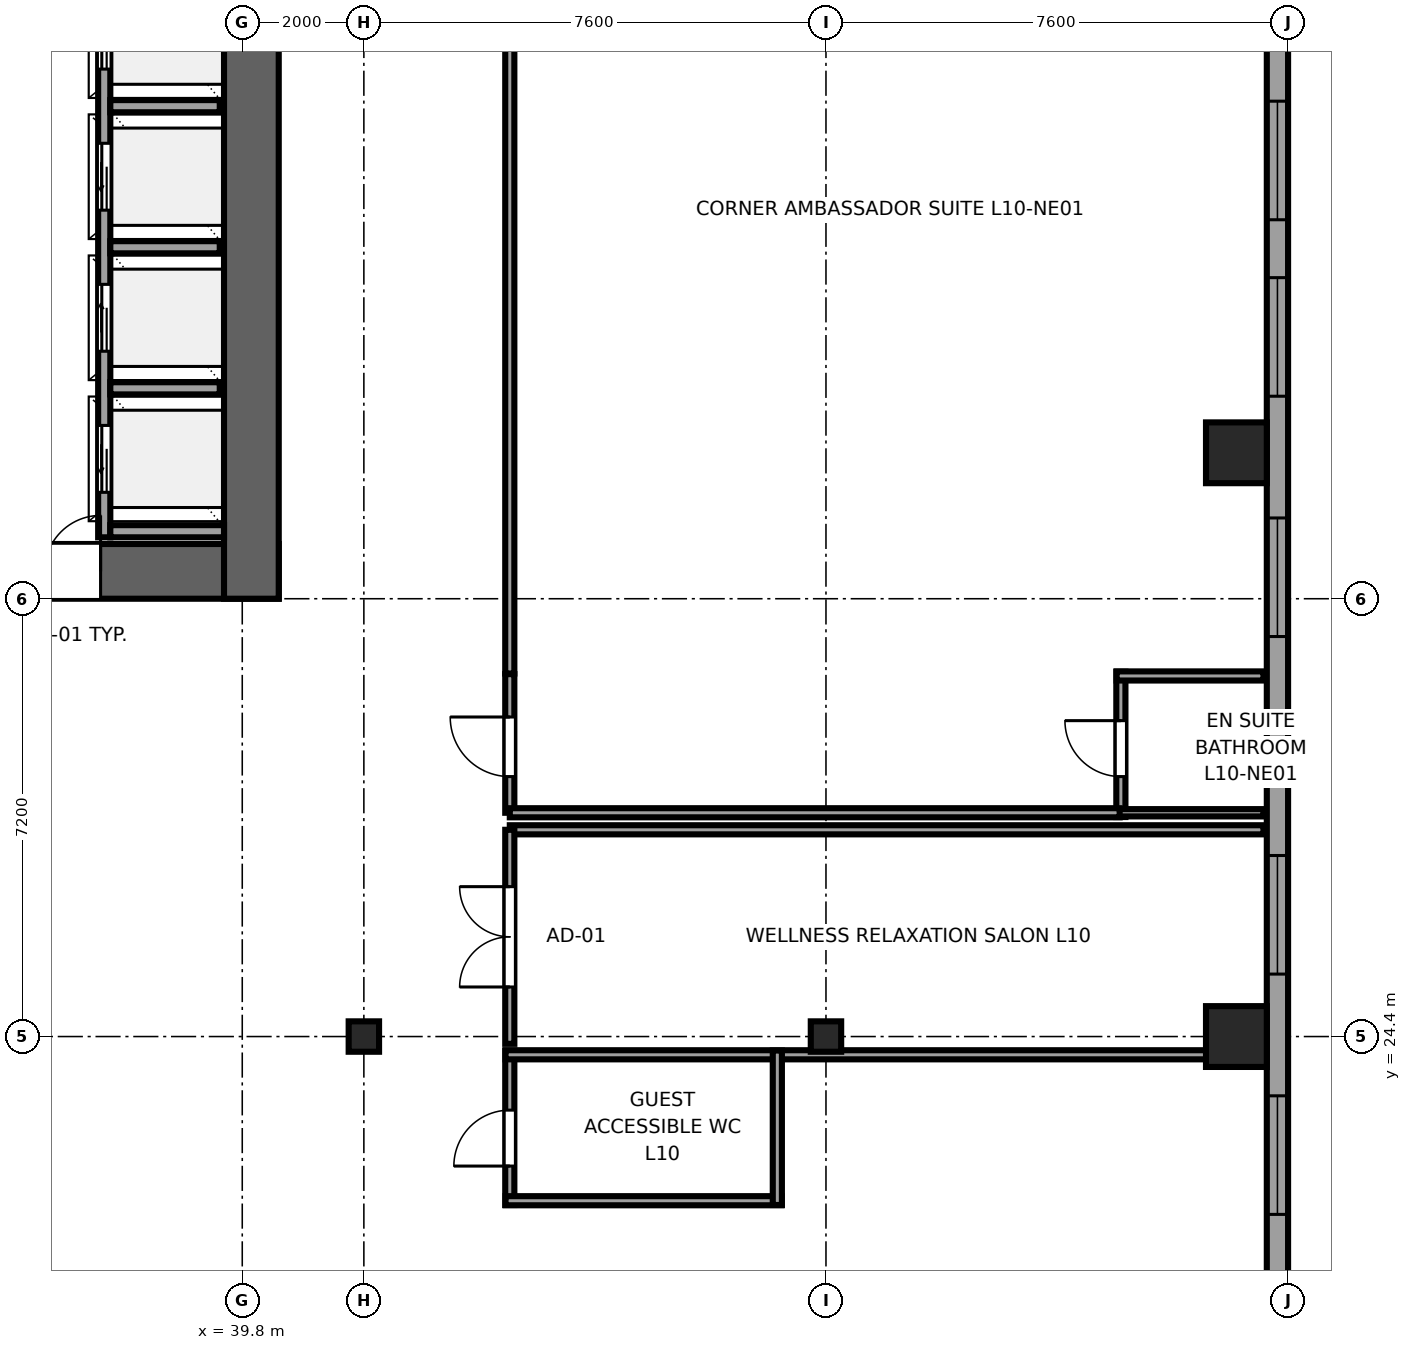
"""IFC4 building model, lengths in metres.
Left out: names, types, materials, properties, quantities, classifications, styles, units other than length and angle.
Written with IfcOpenShell. Run it as: python <this file> out.ifc"""

import sys

from ifc_helpers import new_model, si_unit, direction, frame, frame_2d, origin, origin_2d, place, context, subcontext, project, spatial, rectangle, i_section, extrude, source, transform, mapped, element, fill, save


model = new_model("IFC4")
c1 = context("Model", 3, precision=1e-05, world=origin(), true_north=direction((0.0, 1.0)))
c2 = subcontext(c1, "Body", "Model", "MODEL_VIEW")
j1 = project(units=[si_unit("LENGTHUNIT", "METRE"), si_unit("PLANEANGLEUNIT", "RADIAN")], contexts=[c1])
p1 = place(None, origin())
s1 = spatial("IfcSite", under=j1, at=p1, CompositionType="ELEMENT")
p2 = place(p1, origin())
s2 = spatial("IfcBuilding", under=s1, at=p2, CompositionType="ELEMENT")
p3 = place(p2, frame((0.0, 0.0, 46.2)))
s3 = spatial("IfcBuildingStorey", under=s2, at=p3, CompositionType="ELEMENT", Elevation=46.2)
p4 = place(p3, frame((36.4, 32.05, 0.0), z_axis=(0.0, 0.0, 1.0), x_axis=(1.0, 0.0, 0.0)))
e1 = element("IfcWall", 1, at=p4, inside=s3, PredefinedType="SHEAR", context=c2, shape_type="SweptSolid", body=[
    extrude(rectangle(XDim=4.0, YDim=0.9, at=frame_2d((2.0, 0.0))), origin(), (0.0, 0.0, 1.0), 3.55),
])
p5 = place(p4, frame((1.07, 0.0, 0.0), z_axis=(0.0, 0.0, 1.0), x_axis=(-1.0, 0.0, 0.0)))
e2 = element("IfcOpeningElement", 2, at=p5, cuts=e1, PredefinedType="OPENING", context=c2, shape_type="SweptSolid", body=[
    extrude(rectangle(XDim=0.92, YDim=2.01, at=frame_2d((0.46, 1.005))), frame((0.0, 0.46, 0.0), z_axis=(0.0, -1.0, 0.0), x_axis=(1.0, 0.0, 0.0)), (0.0, 0.0, 1.0), 0.92),
])
p6 = place(p3, frame((39.95, 31.6, 0.0), z_axis=(0.0, 0.0, 1.0), x_axis=(0.0, 1.0, 0.0)))
e3 = element("IfcWall", 3, at=p6, inside=s3, PredefinedType="SHEAR", context=c2, shape_type="SweptSolid", body=[
    extrude(rectangle(XDim=13.6, YDim=0.9, at=frame_2d((6.8, 0.0))), origin(), (0.0, 0.0, 1.0), 3.55),
])
m1 = source(origin(), c2, "Body", "SweptSolid", [
    extrude(i_section(OverallWidth=0.5, OverallDepth=0.5, WebThickness=0.028, FlangeThickness=0.045, at=origin_2d()), origin(), (0.0, 0.0, 1.0), 3.55),
])
for number, where, z_axis, x_axis in (
    (4, (41.8, 24.4, 0.0), (0.0, 0.0, 1.0), (1.0, 0.0, 0.0)),
    (5, (49.4, 24.4, 0.0), (0.0, 0.0, 1.0), (1.0, 0.0, 0.0)),
):
    element("IfcColumn", number, at=place(p3, frame(where, z_axis=z_axis, x_axis=x_axis)), inside=s3, PredefinedType="COLUMN", context=c2, shape_type="MappedRepresentation", body=[
        mapped(m1, transform((0.0, 0.0, 0.0), x_axis=(1.0, 0.0, 0.0), y_axis=(0.0, 1.0, 0.0), z_axis=(0.0, 0.0, 1.0), scale=1.0)),
    ])
m2 = source(origin(), c2, "Body", "SweptSolid", [
    extrude(rectangle(XDim=1.0, YDim=1.0, at=origin_2d()), origin(), (0.0, 0.0, 1.0), 3.55),
])
for number, where, z_axis, x_axis in (
    (6, (56.15, 24.4, 0.0), (0.0, 0.0, 1.0), (1.0, 0.0, 0.0)),
    (7, (56.15, 34.0, 0.0), (0.0, 0.0, 1.0), (1.0, 0.0, 0.0)),
):
    element("IfcColumn", number, at=place(p3, frame(where, z_axis=z_axis, x_axis=x_axis)), inside=s3, PredefinedType="COLUMN", context=c2, shape_type="MappedRepresentation", body=[
        mapped(m2, transform((0.0, 0.0, 0.0), x_axis=(1.0, 0.0, 0.0), y_axis=(0.0, 1.0, 0.0), z_axis=(0.0, 0.0, 1.0), scale=1.0)),
    ])
p7 = place(p3, frame((56.825, 4.617, 0.0), z_axis=(0.0, 0.0, 1.0), x_axis=(0.0, 1.0, 0.0)))
e8 = element("IfcWall", 8, at=p7, inside=s3, PredefinedType="SOLIDWALL", context=c2, shape_type="SweptSolid", body=[
    extrude(rectangle(XDim=36.766, YDim=0.35, at=frame_2d((18.383, 0.0))), origin(), (0.0, 0.0, 1.0), 3.37),
])
p8 = place(p7, frame((5.553, 0.0, 0.68)))
e9 = element("IfcOpeningElement", 9, at=p8, cuts=e8, PredefinedType="OPENING", context=c2, shape_type="SweptSolid", body=[
    extrude(rectangle(XDim=1.95, YDim=1.82, at=frame_2d((0.975, 0.91))), frame((0.0, 0.185, 0.0), z_axis=(0.0, -1.0, 0.0), x_axis=(1.0, 0.0, 0.0)), (0.0, 0.0, 1.0), 0.37),
])
p9 = place(p7, frame((12.406, 0.0, 0.68)))
e10 = element("IfcOpeningElement", 10, at=p9, cuts=e8, PredefinedType="OPENING", context=c2, shape_type="SweptSolid", body=[
    extrude(rectangle(XDim=1.95, YDim=1.82, at=frame_2d((0.975, 0.91))), frame((0.0, 0.185, 0.0), z_axis=(0.0, -1.0, 0.0), x_axis=(1.0, 0.0, 0.0)), (0.0, 0.0, 1.0), 0.37),
])
p10 = place(p7, frame((16.858, 0.0, 0.68)))
e11 = element("IfcOpeningElement", 11, at=p10, cuts=e8, PredefinedType="OPENING", context=c2, shape_type="SweptSolid", body=[
    extrude(rectangle(XDim=1.95, YDim=1.82, at=frame_2d((0.975, 0.91))), frame((0.0, 0.185, 0.0), z_axis=(0.0, -1.0, 0.0), x_axis=(1.0, 0.0, 0.0)), (0.0, 0.0, 1.0), 0.37),
])
p11 = place(p7, frame((20.81, 0.0, 0.68)))
e12 = element("IfcOpeningElement", 12, at=p11, cuts=e8, PredefinedType="OPENING", context=c2, shape_type="SweptSolid", body=[
    extrude(rectangle(XDim=1.95, YDim=1.82, at=frame_2d((0.975, 0.91))), frame((0.0, 0.185, 0.0), z_axis=(0.0, -1.0, 0.0), x_axis=(1.0, 0.0, 0.0)), (0.0, 0.0, 1.0), 0.37),
])
p12 = place(p7, frame((26.361, 0.0, 0.68)))
e13 = element("IfcOpeningElement", 13, at=p12, cuts=e8, PredefinedType="OPENING", context=c2, shape_type="SweptSolid", body=[
    extrude(rectangle(XDim=1.95, YDim=1.82, at=frame_2d((0.975, 0.91))), frame((0.0, 0.185, 0.0), z_axis=(0.0, -1.0, 0.0), x_axis=(1.0, 0.0, 0.0)), (0.0, 0.0, 1.0), 0.37),
])
p13 = place(p7, frame((30.313, 0.0, 0.68)))
e14 = element("IfcOpeningElement", 14, at=p13, cuts=e8, PredefinedType="OPENING", context=c2, shape_type="SweptSolid", body=[
    extrude(rectangle(XDim=1.95, YDim=1.82, at=frame_2d((0.975, 0.91))), frame((0.0, 0.185, 0.0), z_axis=(0.0, -1.0, 0.0), x_axis=(1.0, 0.0, 0.0)), (0.0, 0.0, 1.0), 0.37),
])
p14 = place(p7, frame((33.215, 0.0, 0.68)))
e15 = element("IfcOpeningElement", 15, at=p14, cuts=e8, PredefinedType="OPENING", context=c2, shape_type="SweptSolid", body=[
    extrude(rectangle(XDim=1.95, YDim=1.82, at=frame_2d((0.975, 0.91))), frame((0.0, 0.185, 0.0), z_axis=(0.0, -1.0, 0.0), x_axis=(1.0, 0.0, 0.0)), (0.0, 0.0, 1.0), 0.37),
])
p15 = place(p3, frame((37.53, 32.61, 0.0), z_axis=(0.0, 0.0, 1.0), x_axis=(0.0, 1.0, 0.0)))
e16 = element("IfcWall", 16, at=p15, inside=s3, PredefinedType="SOLIDWALL", context=c2, shape_type="SweptSolid", body=[
    extrude(rectangle(XDim=9.54, YDim=0.2, at=frame_2d((4.77, 0.0))), origin(), (0.0, 0.0, 1.0), 3.37),
])
p16 = place(p15, frame((0.74, 0.0, 0.0)))
e17 = element("IfcOpeningElement", 17, at=p16, cuts=e16, PredefinedType="OPENING", context=c2, shape_type="SweptSolid", body=[
    extrude(rectangle(XDim=1.1, YDim=2.12, at=frame_2d((0.55, 1.06))), frame((0.0, 0.11, 0.0), z_axis=(0.0, -1.0, 0.0), x_axis=(1.0, 0.0, 0.0)), (0.0, 0.0, 1.0), 0.22),
])
p17 = place(p15, frame((3.06, 0.0, 0.0)))
e18 = element("IfcOpeningElement", 18, at=p17, cuts=e16, PredefinedType="OPENING", context=c2, shape_type="SweptSolid", body=[
    extrude(rectangle(XDim=1.1, YDim=2.12, at=frame_2d((0.55, 1.06))), frame((0.0, 0.11, 0.0), z_axis=(0.0, -1.0, 0.0), x_axis=(1.0, 0.0, 0.0)), (0.0, 0.0, 1.0), 0.22),
])
p18 = place(p15, frame((5.38, 0.0, 0.0)))
e19 = element("IfcOpeningElement", 19, at=p18, cuts=e16, PredefinedType="OPENING", context=c2, shape_type="SweptSolid", body=[
    extrude(rectangle(XDim=1.1, YDim=2.12, at=frame_2d((0.55, 1.06))), frame((0.0, 0.11, 0.0), z_axis=(0.0, -1.0, 0.0), x_axis=(1.0, 0.0, 0.0)), (0.0, 0.0, 1.0), 0.22),
])
p19 = place(p15, frame((7.7, 0.0, 0.0)))
e20 = element("IfcOpeningElement", 20, at=p19, cuts=e16, PredefinedType="OPENING", context=c2, shape_type="SweptSolid", body=[
    extrude(rectangle(XDim=1.1, YDim=2.12, at=frame_2d((0.55, 1.06))), frame((0.0, 0.11, 0.0), z_axis=(0.0, -1.0, 0.0), x_axis=(1.0, 0.0, 0.0)), (0.0, 0.0, 1.0), 0.22),
])
p20 = place(p3, frame((37.63, 32.71, 0.0), z_axis=(0.0, 0.0, 1.0), x_axis=(1.0, 0.0, 0.0)))
e21 = element("IfcWall", 21, at=p20, inside=s3, PredefinedType="SOLIDWALL", context=c2, shape_type="SweptSolid", body=[
    extrude(rectangle(XDim=1.87, YDim=0.2, at=frame_2d((0.935, 0.0))), origin(), (0.0, 0.0, 1.0), 3.37),
])
for number, where, z_axis, x_axis in (
    (22, (37.63, 35.06, 0.0), (0.0, 0.0, 1.0), (1.0, 0.0, 0.0)),
    (23, (37.63, 37.38, 0.0), (0.0, 0.0, 1.0), (1.0, 0.0, 0.0)),
    (24, (37.63, 39.7, 0.0), (0.0, 0.0, 1.0), (1.0, 0.0, 0.0)),
):
    element("IfcWall", number, at=place(p3, frame(where, z_axis=z_axis, x_axis=x_axis)), inside=s3, PredefinedType="SOLIDWALL", context=c2, shape_type="SweptSolid", body=[
        extrude(rectangle(XDim=1.8, YDim=0.2, at=frame_2d((0.9, 0.0))), origin(), (0.0, 0.0, 1.0), 3.37),
    ])
p21 = place(p3, frame((54.25, 28.01, 0.0), z_axis=(0.0, 0.0, 1.0), x_axis=(0.0, 1.0, 0.0)))
e25 = element("IfcWall", 25, at=p21, inside=s3, PredefinedType="PARTITIONING", context=c2, shape_type="SweptSolid", body=[
    extrude(rectangle(XDim=2.39, YDim=0.15, at=frame_2d((1.195, 0.0))), origin(), (0.0, 0.0, 1.0), 3.37),
])
p22 = place(p21, frame((0.665, 0.0, 0.0)))
e26 = element("IfcOpeningElement", 26, at=p22, cuts=e25, PredefinedType="OPENING", context=c2, shape_type="SweptSolid", body=[
    extrude(rectangle(XDim=0.92, YDim=2.01, at=frame_2d((0.46, 1.005))), frame((0.0, 0.085, 0.0), z_axis=(0.0, -1.0, 0.0), x_axis=(1.0, 0.0, 0.0)), (0.0, 0.0, 1.0), 0.17),
])
p23 = place(p3, frame((54.18, 28.08, 0.0), z_axis=(0.0, 0.0, 1.0), x_axis=(1.0, 0.0, 0.0)))
e27 = element("IfcWall", 27, at=p23, inside=s3, PredefinedType="PLUMBINGWALL", context=c2, shape_type="SweptSolid", body=[
    extrude(rectangle(XDim=2.415, YDim=0.12, at=frame_2d((1.208, 0.0))), origin(), (0.0, 0.0, 1.0), 3.37),
])
p24 = place(p3, frame((54.18, 30.33, 0.0), z_axis=(0.0, 0.0, 1.0), x_axis=(1.0, 0.0, 0.0)))
e28 = element("IfcWall", 28, at=p24, inside=s3, PredefinedType="PARTITIONING", context=c2, shape_type="SweptSolid", body=[
    extrude(rectangle(XDim=2.415, YDim=0.15, at=frame_2d((1.208, 0.0))), origin(), (0.0, 0.0, 1.0), 3.37),
])
p25 = place(p3, frame((44.2, 21.63, 0.0), z_axis=(0.0, 0.0, 1.0), x_axis=(0.0, 1.0, 0.0)))
e29 = element("IfcWall", 29, at=p25, inside=s3, PredefinedType="PARTITIONING", context=c2, shape_type="SweptSolid", body=[
    extrude(rectangle(XDim=2.54, YDim=0.15, at=frame_2d((1.27, 0.0))), origin(), (0.0, 0.0, 1.0), 3.37),
])
p26 = place(p25, frame((0.64, 0.0, 0.0)))
e30 = element("IfcOpeningElement", 30, at=p26, cuts=e29, PredefinedType="OPENING", context=c2, shape_type="SweptSolid", body=[
    extrude(rectangle(XDim=0.92, YDim=2.01, at=frame_2d((0.46, 1.005))), frame((0.0, 0.085, 0.0), z_axis=(0.0, -1.0, 0.0), x_axis=(1.0, 0.0, 0.0)), (0.0, 0.0, 1.0), 0.17),
])
p27 = place(p3, frame((44.13, 21.7, 0.0), z_axis=(0.0, 0.0, 1.0), x_axis=(1.0, 0.0, 0.0)))
e31 = element("IfcWall", 31, at=p27, inside=s3, PredefinedType="PARTITIONING", context=c2, shape_type="SweptSolid", body=[
    extrude(rectangle(XDim=4.54, YDim=0.15, at=frame_2d((2.27, 0.0))), origin(), (0.0, 0.0, 1.0), 3.37),
])
p28 = place(p3, frame((44.13, 24.1, 0.0), z_axis=(0.0, 0.0, 1.0), x_axis=(1.0, 0.0, 0.0)))
e32 = element("IfcWall", 32, at=p28, inside=s3, PredefinedType="PARTITIONING", context=c2, shape_type="SweptSolid", body=[
    extrude(rectangle(XDim=12.465, YDim=0.15, at=frame_2d((6.232, 0.0))), origin(), (0.0, 0.0, 1.0), 3.37),
])
p29 = place(p3, frame((48.6, 21.63, 0.0), z_axis=(0.0, 0.0, 1.0), x_axis=(0.0, 1.0, 0.0)))
e33 = element("IfcWall", 33, at=p29, inside=s3, PredefinedType="PARTITIONING", context=c2, shape_type="SweptSolid", body=[
    extrude(rectangle(XDim=2.54, YDim=0.15, at=frame_2d((1.27, 0.0))), origin(), (0.0, 0.0, 1.0), 3.37),
])
p30 = place(p3, frame((44.2, 27.8, 0.0), z_axis=(0.0, 0.0, 1.0), x_axis=(1.0, 0.0, 0.0)))
e34 = element("IfcWall", 34, at=p30, inside=s3, PredefinedType="PARTITIONING", context=c2, shape_type="SweptSolid", body=[
    extrude(rectangle(XDim=12.395, YDim=0.15, at=frame_2d((6.198, 0.0))), origin(), (0.0, 0.0, 1.0), 3.37),
])
p31 = place(p3, frame((44.2, 24.28, 0.0), z_axis=(0.0, 0.0, 1.0), x_axis=(0.0, 1.0, 0.0)))
e35 = element("IfcWall", 35, at=p31, inside=s3, PredefinedType="PARTITIONING", context=c2, shape_type="SweptSolid", body=[
    extrude(rectangle(XDim=3.52, YDim=0.15, at=frame_2d((1.76, 0.0))), origin(), (0.0, 0.0, 1.0), 3.37),
])
p32 = place(p31, frame((0.935, 0.0, 0.0)))
e36 = element("IfcOpeningElement", 36, at=p32, cuts=e35, PredefinedType="OPENING", context=c2, shape_type="SweptSolid", body=[
    extrude(rectangle(XDim=1.65, YDim=2.15, at=frame_2d((0.825, 1.075))), frame((0.0, 0.085, 0.0), z_axis=(0.0, -1.0, 0.0), x_axis=(1.0, 0.0, 0.0)), (0.0, 0.0, 1.0), 0.17),
])
p33 = place(p3, frame((44.2, 28.08, 0.0), z_axis=(0.0, 0.0, 1.0), x_axis=(0.0, 1.0, 0.0)))
e37 = element("IfcWall", 37, at=p33, inside=s3, PredefinedType="PARTITIONING", context=c2, shape_type="SweptSolid", body=[
    extrude(rectangle(XDim=2.28, YDim=0.15, at=frame_2d((1.14, 0.0))), origin(), (0.0, 0.0, 1.0), 3.37),
])
p34 = place(p33, frame((0.595, 0.0, 0.0)))
e38 = element("IfcOpeningElement", 38, at=p34, cuts=e37, PredefinedType="OPENING", context=c2, shape_type="SweptSolid", body=[
    extrude(rectangle(XDim=0.98, YDim=2.12, at=frame_2d((0.49, 1.06))), frame((0.0, 0.085, 0.0), z_axis=(0.0, -1.0, 0.0), x_axis=(1.0, 0.0, 0.0)), (0.0, 0.0, 1.0), 0.17),
])
p35 = place(p3, frame((44.2, 28.08, 0.0), z_axis=(0.0, 0.0, 1.0), x_axis=(1.0, 0.0, 0.0)))
e39 = element("IfcWall", 39, at=p35, inside=s3, PredefinedType="PARTITIONING", context=c2, shape_type="SweptSolid", body=[
    extrude(rectangle(XDim=10.03, YDim=0.15, at=frame_2d((5.015, 0.0))), origin(), (0.0, 0.0, 1.0), 3.37),
])
p36 = place(p3, frame((44.2, 30.37, 0.0), z_axis=(0.0, 0.0, 1.0), x_axis=(0.0, 1.0, 0.0)))
e40 = element("IfcWall", 40, at=p36, inside=s3, PredefinedType="PARTITIONING", context=c2, shape_type="SweptSolid", body=[
    extrude(rectangle(XDim=15.225, YDim=0.15, at=frame_2d((7.612, 0.0))), origin(), (0.0, 0.0, 1.0), 3.37),
])
m3 = source(origin(), c2, "Body", "SweptSolid", [
    extrude(rectangle(XDim=1.95, YDim=1.82, at=frame_2d((0.975, 0.91))), frame((0.0, 0.09, 0.0), z_axis=(0.0, -1.0, 0.0), x_axis=(1.0, 0.0, 0.0)), (0.0, 0.0, 1.0), 0.06),
])
p37 = place(p10, origin())
e41 = element("IfcWindow", 41, at=p37, inside=s3, PartitioningType="DOUBLE_PANEL_VERTICAL", PredefinedType="WINDOW", context=c2, shape_type="MappedRepresentation", body=[
    mapped(m3, transform((0.0, 0.0, 0.0), x_axis=(1.0, 0.0, 0.0), y_axis=(0.0, 1.0, 0.0), z_axis=(0.0, 0.0, 1.0), scale=1.0)),
])
fill(e11, e41)
p38 = place(p11, origin())
e42 = element("IfcWindow", 42, at=p38, inside=s3, PartitioningType="DOUBLE_PANEL_VERTICAL", PredefinedType="WINDOW", context=c2, shape_type="MappedRepresentation", body=[
    mapped(m3, transform((0.0, 0.0, 0.0), x_axis=(1.0, 0.0, 0.0), y_axis=(0.0, 1.0, 0.0), z_axis=(0.0, 0.0, 1.0), scale=1.0)),
])
fill(e12, e42)
p39 = place(p12, origin())
e43 = element("IfcWindow", 43, at=p39, inside=s3, PartitioningType="DOUBLE_PANEL_VERTICAL", PredefinedType="WINDOW", context=c2, shape_type="MappedRepresentation", body=[
    mapped(m3, transform((0.0, 0.0, 0.0), x_axis=(1.0, 0.0, 0.0), y_axis=(0.0, 1.0, 0.0), z_axis=(0.0, 0.0, 1.0), scale=1.0)),
])
fill(e13, e43)
p40 = place(p13, origin())
e44 = element("IfcWindow", 44, at=p40, inside=s3, PartitioningType="DOUBLE_PANEL_VERTICAL", PredefinedType="WINDOW", context=c2, shape_type="MappedRepresentation", body=[
    mapped(m3, transform((0.0, 0.0, 0.0), x_axis=(1.0, 0.0, 0.0), y_axis=(0.0, 1.0, 0.0), z_axis=(0.0, 0.0, 1.0), scale=1.0)),
])
fill(e14, e44)
p41 = place(p14, origin())
e45 = element("IfcWindow", 45, at=p41, inside=s3, PartitioningType="DOUBLE_PANEL_VERTICAL", PredefinedType="WINDOW", context=c2, shape_type="MappedRepresentation", body=[
    mapped(m3, transform((0.0, 0.0, 0.0), x_axis=(1.0, 0.0, 0.0), y_axis=(0.0, 1.0, 0.0), z_axis=(0.0, 0.0, 1.0), scale=1.0)),
])
fill(e15, e45)
m4 = source(origin(), c2, "Body", "SweptSolid", [
    extrude(rectangle(XDim=0.92, YDim=2.01, at=frame_2d((0.46, 1.005))), frame((0.0, 0.025, 0.0), z_axis=(0.0, -1.0, 0.0), x_axis=(1.0, 0.0, 0.0)), (0.0, 0.0, 1.0), 0.05),
])
p42 = place(p5, origin())
e46 = element("IfcDoor", 46, at=p42, inside=s3, OperationType="SINGLE_SWING_RIGHT", PredefinedType="DOOR", context=c2, shape_type="MappedRepresentation", body=[
    mapped(m4, transform((0.0, 0.0, 0.0), x_axis=(1.0, 0.0, 0.0), y_axis=(0.0, 1.0, 0.0), z_axis=(0.0, 0.0, 1.0), scale=1.0)),
])
fill(e2, e46)
m5 = source(origin(), c2, "Body", "SweptSolid", [
    extrude(rectangle(XDim=1.1, YDim=2.12, at=frame_2d((0.55, 1.06))), frame((0.0, 0.025, 0.0), z_axis=(0.0, -1.0, 0.0), x_axis=(1.0, 0.0, 0.0)), (0.0, 0.0, 1.0), 0.05),
])
p43 = place(p16, origin())
e47 = element("IfcDoor", 47, at=p43, inside=s3, OperationType="SLIDING_TO_LEFT", PredefinedType="DOOR", context=c2, shape_type="MappedRepresentation", body=[
    mapped(m5, transform((0.0, 0.0, 0.0), x_axis=(1.0, 0.0, 0.0), y_axis=(0.0, 1.0, 0.0), z_axis=(0.0, 0.0, 1.0), scale=1.0)),
])
fill(e17, e47)
p44 = place(p17, origin())
e48 = element("IfcDoor", 48, at=p44, inside=s3, OperationType="SLIDING_TO_RIGHT", PredefinedType="DOOR", context=c2, shape_type="MappedRepresentation", body=[
    mapped(m5, transform((0.0, 0.0, 0.0), x_axis=(1.0, 0.0, 0.0), y_axis=(0.0, 1.0, 0.0), z_axis=(0.0, 0.0, 1.0), scale=1.0)),
])
fill(e18, e48)
p45 = place(p18, origin())
e49 = element("IfcDoor", 49, at=p45, inside=s3, OperationType="SLIDING_TO_LEFT", PredefinedType="DOOR", context=c2, shape_type="MappedRepresentation", body=[
    mapped(m5, transform((0.0, 0.0, 0.0), x_axis=(1.0, 0.0, 0.0), y_axis=(0.0, 1.0, 0.0), z_axis=(0.0, 0.0, 1.0), scale=1.0)),
])
fill(e19, e49)
p46 = place(p19, origin())
e50 = element("IfcDoor", 50, at=p46, inside=s3, OperationType="SLIDING_TO_RIGHT", PredefinedType="DOOR", context=c2, shape_type="MappedRepresentation", body=[
    mapped(m5, transform((0.0, 0.0, 0.0), x_axis=(1.0, 0.0, 0.0), y_axis=(0.0, 1.0, 0.0), z_axis=(0.0, 0.0, 1.0), scale=1.0)),
])
fill(e20, e50)
p47 = place(p22, origin())
e51 = element("IfcDoor", 51, at=p47, inside=s3, OperationType="SINGLE_SWING_RIGHT", PredefinedType="DOOR", context=c2, shape_type="MappedRepresentation", body=[
    mapped(m4, transform((0.0, 0.0, 0.0), x_axis=(1.0, 0.0, 0.0), y_axis=(0.0, 1.0, 0.0), z_axis=(0.0, 0.0, 1.0), scale=1.0)),
])
fill(e26, e51)
p48 = place(p26, origin())
e52 = element("IfcDoor", 52, at=p48, inside=s3, OperationType="SINGLE_SWING_LEFT", PredefinedType="DOOR", context=c2, shape_type="MappedRepresentation", body=[
    mapped(m4, transform((0.0, 0.0, 0.0), x_axis=(1.0, 0.0, 0.0), y_axis=(0.0, 1.0, 0.0), z_axis=(0.0, 0.0, 1.0), scale=1.0)),
])
fill(e30, e52)
m6 = source(origin(), c2, "Body", "SweptSolid", [
    extrude(rectangle(XDim=1.65, YDim=2.15, at=frame_2d((0.825, 1.075))), frame((0.0, 0.025, 0.0), z_axis=(0.0, -1.0, 0.0), x_axis=(1.0, 0.0, 0.0)), (0.0, 0.0, 1.0), 0.05),
])
p49 = place(p32, origin())
e53 = element("IfcDoor", 53, at=p49, inside=s3, OperationType="DOUBLE_DOOR_SINGLE_SWING", PredefinedType="DOOR", context=c2, shape_type="MappedRepresentation", body=[
    mapped(m6, transform((0.0, 0.0, 0.0), x_axis=(1.0, 0.0, 0.0), y_axis=(0.0, 1.0, 0.0), z_axis=(0.0, 0.0, 1.0), scale=1.0)),
])
fill(e36, e53)
m7 = source(origin(), c2, "Body", "SweptSolid", [
    extrude(rectangle(XDim=0.98, YDim=2.12, at=frame_2d((0.49, 1.06))), frame((0.0, 0.025, 0.0), z_axis=(0.0, -1.0, 0.0), x_axis=(1.0, 0.0, 0.0)), (0.0, 0.0, 1.0), 0.05),
])
p50 = place(p34, origin())
e54 = element("IfcDoor", 54, at=p50, inside=s3, OperationType="SINGLE_SWING_RIGHT", PredefinedType="DOOR", context=c2, shape_type="MappedRepresentation", body=[
    mapped(m7, transform((0.0, 0.0, 0.0), x_axis=(1.0, 0.0, 0.0), y_axis=(0.0, 1.0, 0.0), z_axis=(0.0, 0.0, 1.0), scale=1.0)),
])
fill(e38, e54)
save(model, sys.argv[1])
